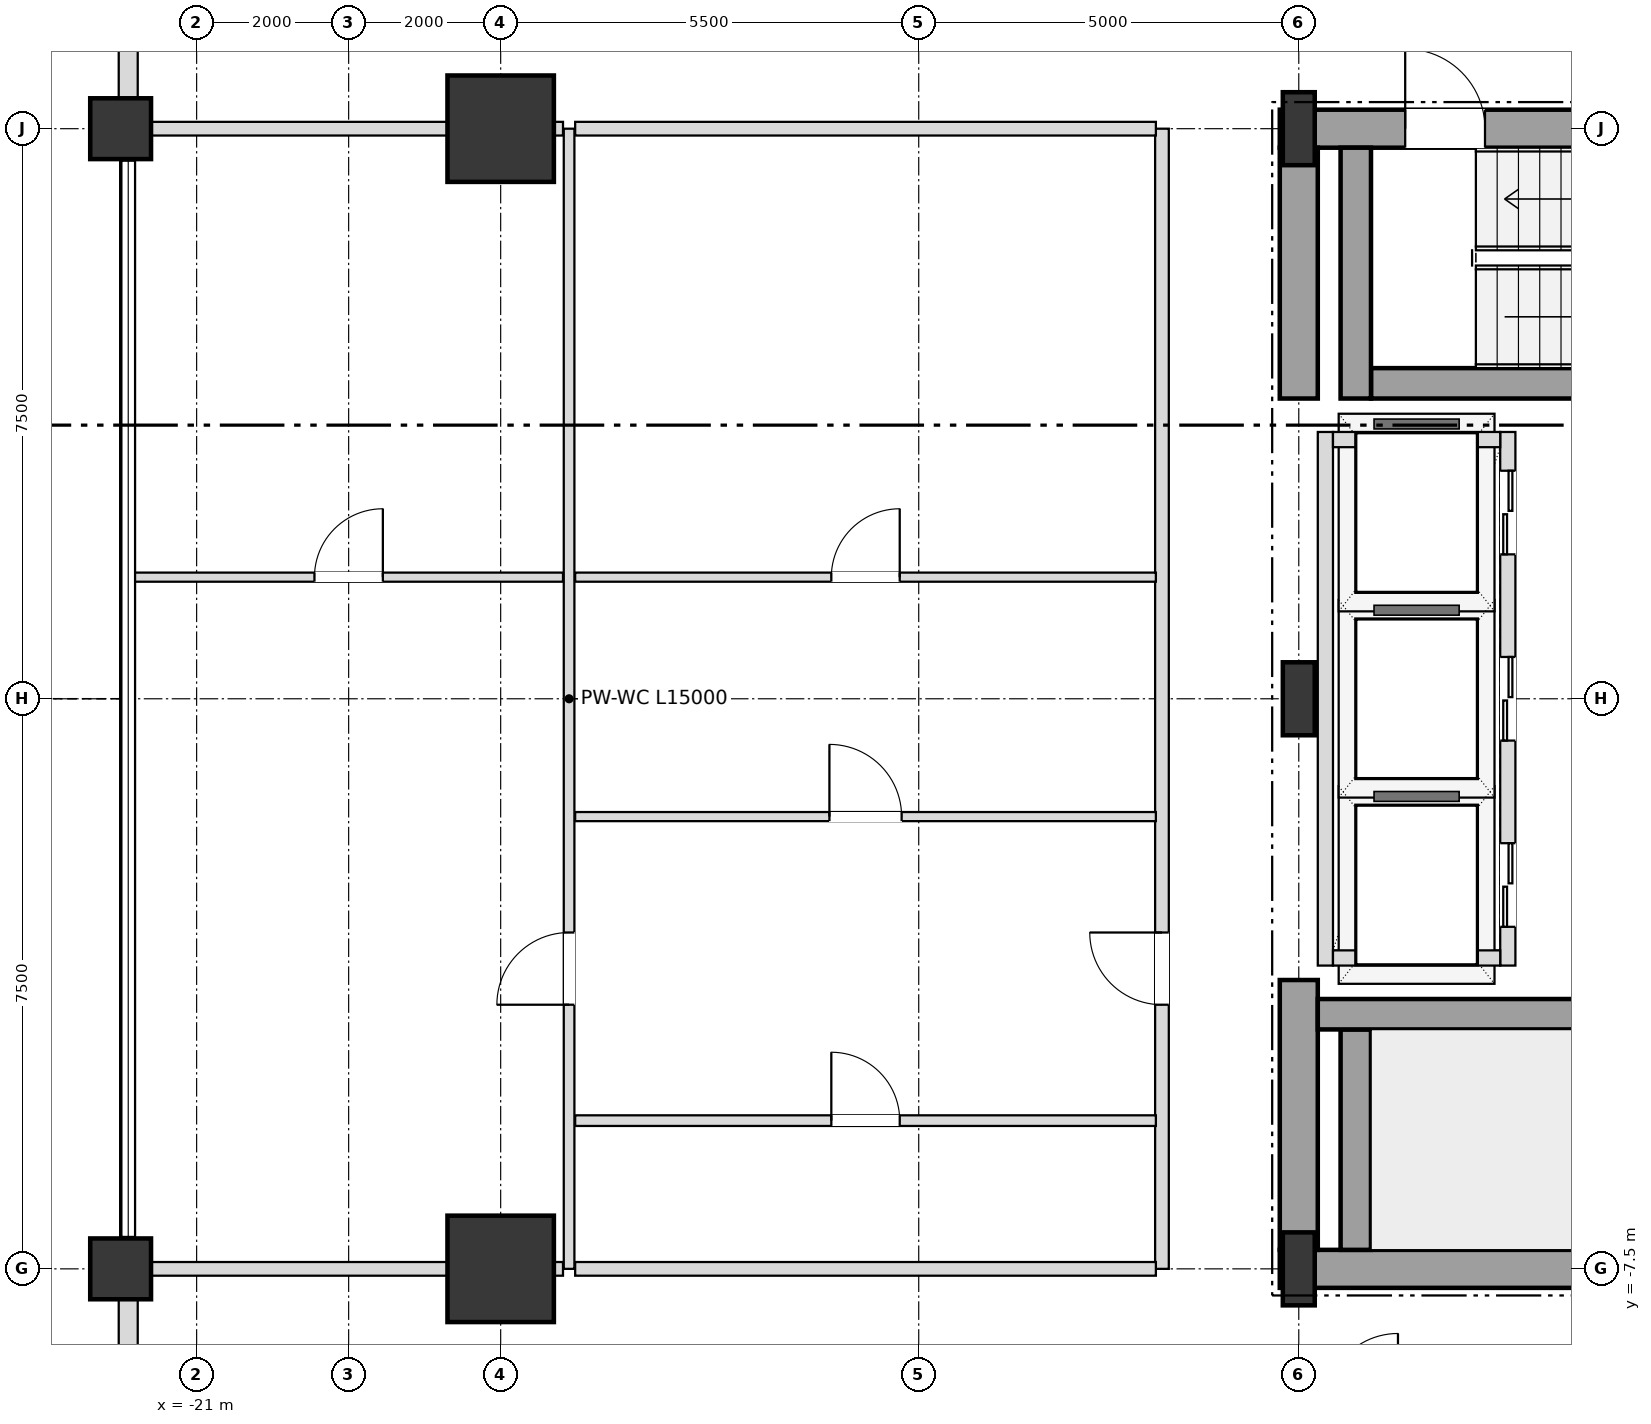
"""IFC4 building model, lengths in metres.
Left out: names, types, materials, properties, quantities, classifications, styles, units other than length and angle.
Written with IfcOpenShell. Run it as: python <this file> out.ifc"""

import sys

from ifc_helpers import new_model, si_unit, direction, frame, frame_2d, origin, origin_2d, place, context, subcontext, project, spatial, rectangle, i_section, extrude, element, fill, save


model = new_model("IFC4")
c1 = context("Model", 3, precision=1e-05, world=origin(), true_north=direction((0.0, 1.0)))
c2 = subcontext(c1, "Body", "Model", "MODEL_VIEW")
j1 = project(units=[si_unit("LENGTHUNIT", "METRE"), si_unit("PLANEANGLEUNIT", "RADIAN")], contexts=[c1])
p1 = place(None, origin())
s1 = spatial("IfcSite", under=j1, at=p1, CompositionType="ELEMENT")
p2 = place(p1, origin())
s2 = spatial("IfcBuilding", under=s1, at=p2, CompositionType="ELEMENT")
p3 = place(p2, frame((0.0, 0.0, 39.6)))
s3 = spatial("IfcBuildingStorey", under=s2, at=p3, CompositionType="ELEMENT", Elevation=39.6)
for number, where, z_axis, x_axis in (
    (1, (-6.5, -7.5, 0.0), (0.0, 0.0, 1.0), (1.0, 0.0, 0.0)),
    (2, (-6.5, 0.0, 0.0), (0.0, 0.0, 1.0), (1.0, 0.0, 0.0)),
    (3, (-6.5, 7.5, 0.0), (0.0, 0.0, 1.0), (1.0, 0.0, 0.0)),
):
    element("IfcColumn", number, at=place(p3, frame(where, z_axis=z_axis, x_axis=x_axis)), inside=s3, PredefinedType="COLUMN", context=c2, shape_type="SweptSolid", body=[
        extrude(i_section(OverallWidth=0.42, OverallDepth=0.96, WebThickness=0.022, FlangeThickness=0.034, at=origin_2d()), origin(), (0.0, 0.0, 1.0), 3.6),
    ])
for number, where, z_axis, x_axis in (
    (4, (-17.0, 7.5, 0.0), (0.0, 0.0, 1.0), (1.0, 0.0, 0.0)),
    (5, (-17.0, -7.5, 0.0), (0.0, 0.0, 1.0), (1.0, 0.0, 0.0)),
):
    element("IfcColumn", number, at=place(p3, frame(where, z_axis=z_axis, x_axis=x_axis)), inside=s3, PredefinedType="USERDEFINED", context=c2, shape_type="SweptSolid", body=[
        extrude(rectangle(XDim=1.4, YDim=1.4, at=origin_2d()), origin(), (0.0, 0.0, 1.0), 3.6),
    ])
for number, where, z_axis, x_axis in (
    (6, (-22.0, -7.5, 0.0), (0.0, 0.0, 1.0), (1.0, 0.0, 0.0)),
    (7, (-22.0, 7.5, 0.0), (0.0, 0.0, 1.0), (1.0, 0.0, 0.0)),
):
    element("IfcColumn", number, at=place(p3, frame(where, z_axis=z_axis, x_axis=x_axis)), inside=s3, PredefinedType="COLUMN", context=c2, shape_type="SweptSolid", body=[
        extrude(rectangle(XDim=0.8, YDim=0.8, at=origin_2d()), origin(), (0.0, 0.0, 1.0), 3.6),
    ])
p4 = place(p3, frame((-21.9, 12.605, 0.0), z_axis=(0.0, 0.0, 1.0), x_axis=(0.0, -1.0, 0.0)))
e8 = element("IfcWall", 8, at=p4, inside=s3, PredefinedType="SOLIDWALL", context=c2, shape_type="SweptSolid", body=[
    extrude(rectangle(XDim=4.71, YDim=0.25, at=frame_2d((2.355, 0.0))), origin(), (0.0, 0.0, 1.0), 2.736),
])
p5 = place(p4, frame((1.455, 0.0, 0.72)))
e9 = element("IfcOpeningElement", 9, at=p5, cuts=e8, PredefinedType="OPENING", context=c2, shape_type="SweptSolid", body=[
    extrude(rectangle(XDim=1.8, YDim=1.68, at=frame_2d((0.9, 0.84))), frame((0.0, 0.135, 0.0), z_axis=(0.0, -1.0, 0.0), x_axis=(1.0, 0.0, 0.0)), (0.0, 0.0, 1.0), 0.27),
])
p6 = place(p3, frame((-21.9, -7.895, 0.0), z_axis=(0.0, 0.0, 1.0), x_axis=(0.0, -1.0, 0.0)))
e10 = element("IfcWall", 10, at=p6, inside=s3, PredefinedType="SOLIDWALL", context=c2, shape_type="SweptSolid", body=[
    extrude(rectangle(XDim=4.71, YDim=0.25, at=frame_2d((2.355, 0.0))), origin(), (0.0, 0.0, 1.0), 2.736),
])
p7 = place(p6, frame((1.455, 0.0, 0.72)))
e11 = element("IfcOpeningElement", 11, at=p7, cuts=e10, PredefinedType="OPENING", context=c2, shape_type="SweptSolid", body=[
    extrude(rectangle(XDim=1.8, YDim=1.68, at=frame_2d((0.9, 0.84))), frame((0.0, 0.135, 0.0), z_axis=(0.0, -1.0, 0.0), x_axis=(1.0, 0.0, 0.0)), (0.0, 0.0, 1.0), 0.27),
])
p8 = place(p3, frame((-6.75, -7.5, 0.0), z_axis=(0.0, 0.0, 1.0), x_axis=(1.0, 0.0, 0.0)))
e12 = element("IfcWall", 12, at=p8, inside=s3, PredefinedType="SHEAR", context=c2, shape_type="SweptSolid", body=[
    extrude(rectangle(XDim=6.75, YDim=0.5, at=frame_2d((3.375, 0.0))), origin(), (0.0, 0.0, 1.0), 3.38),
])
p9 = place(p3, frame((-6.75, 7.5, 0.0), z_axis=(0.0, 0.0, 1.0), x_axis=(1.0, 0.0, 0.0)))
e13 = element("IfcWall", 13, at=p9, inside=s3, PredefinedType="SHEAR", context=c2, shape_type="SweptSolid", body=[
    extrude(rectangle(XDim=6.75, YDim=0.5, at=frame_2d((3.375, 0.0))), origin(), (0.0, 0.0, 1.0), 3.38),
])
p10 = place(p9, frame((1.65, 0.0, 0.0)))
e14 = element("IfcOpeningElement", 14, at=p10, cuts=e13, PredefinedType="OPENING", context=c2, shape_type="SweptSolid", body=[
    extrude(rectangle(XDim=1.05, YDim=2.15, at=frame_2d((0.525, 1.075))), frame((0.0, 0.26, 0.0), z_axis=(0.0, -1.0, 0.0), x_axis=(1.0, 0.0, 0.0)), (0.0, 0.0, 1.0), 0.52),
])
p11 = place(p3, frame((-6.5, -7.25, 0.0), z_axis=(0.0, 0.0, 1.0), x_axis=(0.0, 1.0, 0.0)))
e15 = element("IfcWall", 15, at=p11, inside=s3, PredefinedType="SHEAR", context=c2, shape_type="SweptSolid", body=[
    extrude(rectangle(XDim=3.55, YDim=0.5, at=frame_2d((1.775, 0.0))), origin(), (0.0, 0.0, 1.0), 3.38),
])
p12 = place(p3, frame((-6.5, 3.95, 0.0), z_axis=(0.0, 0.0, 1.0), x_axis=(0.0, 1.0, 0.0)))
e16 = element("IfcWall", 16, at=p12, inside=s3, PredefinedType="SHEAR", context=c2, shape_type="SweptSolid", body=[
    extrude(rectangle(XDim=3.3, YDim=0.5, at=frame_2d((1.65, 0.0))), origin(), (0.0, 0.0, 1.0), 3.38),
])
p13 = place(p3, frame((-5.75, -7.25, 0.0), z_axis=(0.0, 0.0, 1.0), x_axis=(0.0, 1.0, 0.0)))
e17 = element("IfcWall", 17, at=p13, inside=s3, PredefinedType="SHEAR", context=c2, shape_type="SweptSolid", body=[
    extrude(rectangle(XDim=2.9, YDim=0.4, at=frame_2d((1.45, 0.0))), origin(), (0.0, 0.0, 1.0), 3.38),
])
p14 = place(p3, frame((-6.25, -4.15, 0.0), z_axis=(0.0, 0.0, 1.0), x_axis=(1.0, 0.0, 0.0)))
e18 = element("IfcWall", 18, at=p14, inside=s3, PredefinedType="SHEAR", context=c2, shape_type="SweptSolid", body=[
    extrude(rectangle(XDim=7.78, YDim=0.4, at=frame_2d((3.89, 0.0))), origin(), (0.0, 0.0, 1.0), 3.38),
])
p15 = place(p3, frame((-5.55, 4.15, 0.0), z_axis=(0.0, 0.0, 1.0), x_axis=(1.0, 0.0, 0.0)))
e19 = element("IfcWall", 19, at=p15, inside=s3, PredefinedType="SHEAR", context=c2, shape_type="SweptSolid", body=[
    extrude(rectangle(XDim=7.08, YDim=0.4, at=frame_2d((3.54, 0.0))), origin(), (0.0, 0.0, 1.0), 3.38),
])
p16 = place(p3, frame((-5.75, 3.95, 0.0), z_axis=(0.0, 0.0, 1.0), x_axis=(0.0, 1.0, 0.0)))
e20 = element("IfcWall", 20, at=p16, inside=s3, PredefinedType="SHEAR", context=c2, shape_type="SweptSolid", body=[
    extrude(rectangle(XDim=3.3, YDim=0.4, at=frame_2d((1.65, 0.0))), origin(), (0.0, 0.0, 1.0), 3.38),
])
p17 = place(p3, frame((-3.75, -3.51, 0.0), z_axis=(0.0, 0.0, 1.0), x_axis=(0.0, 1.0, 0.0)))
e21 = element("IfcWall", 21, at=p17, inside=s3, PredefinedType="SOLIDWALL", context=c2, shape_type="SweptSolid", body=[
    extrude(rectangle(XDim=7.02, YDim=0.2, at=frame_2d((3.51, 0.0))), origin(), (0.0, 0.0, 1.0), 3.38),
])
p18 = place(p17, frame((0.51, 0.0, 0.0)))
e22 = element("IfcOpeningElement", 22, at=p18, cuts=e21, PredefinedType="OPENING", context=c2, shape_type="SweptSolid", body=[
    extrude(rectangle(XDim=1.1, YDim=2.15, at=frame_2d((0.55, 1.075))), frame((0.0, 0.11, 0.0), z_axis=(0.0, -1.0, 0.0), x_axis=(1.0, 0.0, 0.0)), (0.0, 0.0, 1.0), 0.22),
])
p19 = place(p17, frame((2.96, 0.0, 0.0)))
e23 = element("IfcOpeningElement", 23, at=p19, cuts=e21, PredefinedType="OPENING", context=c2, shape_type="SweptSolid", body=[
    extrude(rectangle(XDim=1.1, YDim=2.15, at=frame_2d((0.55, 1.075))), frame((0.0, 0.11, 0.0), z_axis=(0.0, -1.0, 0.0), x_axis=(1.0, 0.0, 0.0)), (0.0, 0.0, 1.0), 0.22),
])
p20 = place(p17, frame((5.41, 0.0, 0.0)))
e24 = element("IfcOpeningElement", 24, at=p20, cuts=e21, PredefinedType="OPENING", context=c2, shape_type="SweptSolid", body=[
    extrude(rectangle(XDim=1.1, YDim=2.15, at=frame_2d((0.55, 1.075))), frame((0.0, 0.11, 0.0), z_axis=(0.0, -1.0, 0.0), x_axis=(1.0, 0.0, 0.0)), (0.0, 0.0, 1.0), 0.22),
])
p21 = place(p3, frame((-6.15, -3.51, 0.0), z_axis=(0.0, 0.0, 1.0), x_axis=(0.0, 1.0, 0.0)))
e25 = element("IfcWall", 25, at=p21, inside=s3, PredefinedType="SOLIDWALL", context=c2, shape_type="SweptSolid", body=[
    extrude(rectangle(XDim=7.02, YDim=0.2, at=frame_2d((3.51, 0.0))), origin(), (0.0, 0.0, 1.0), 3.38),
])
for number, where, z_axis, x_axis in (
    (26, (-6.05, -3.41, 0.0), (0.0, 0.0, 1.0), (1.0, 0.0, 0.0)),
    (27, (-6.05, 3.41, 0.0), (0.0, 0.0, 1.0), (1.0, 0.0, 0.0)),
):
    element("IfcWall", number, at=place(p3, frame(where, z_axis=z_axis, x_axis=x_axis)), inside=s3, PredefinedType="SOLIDWALL", context=c2, shape_type="SweptSolid", body=[
        extrude(rectangle(XDim=2.2, YDim=0.2, at=frame_2d((1.1, 0.0))), origin(), (0.0, 0.0, 1.0), 3.38),
    ])
p22 = place(p3, frame((-16.1, -7.5, 0.0), z_axis=(0.0, 0.0, 1.0), x_axis=(0.0, 1.0, 0.0)))
e28 = element("IfcWall", 28, at=p22, inside=s3, PredefinedType="PARTITIONING", context=c2, shape_type="SweptSolid", body=[
    extrude(rectangle(XDim=15.0, YDim=0.14, at=frame_2d((7.5, 0.0))), origin(), (0.0, 0.0, 1.0), 3.38),
])
p23 = place(p22, frame((3.475, 0.0, 0.0)))
e29 = element("IfcOpeningElement", 29, at=p23, cuts=e28, PredefinedType="OPENING", context=c2, shape_type="SweptSolid", body=[
    extrude(rectangle(XDim=0.95, YDim=2.1, at=frame_2d((0.475, 1.05))), frame((0.0, 0.08, 0.0), z_axis=(0.0, -1.0, 0.0), x_axis=(1.0, 0.0, 0.0)), (0.0, 0.0, 1.0), 0.16),
])
p24 = place(p3, frame((-8.3, -7.5, 0.0), z_axis=(0.0, 0.0, 1.0), x_axis=(0.0, 1.0, 0.0)))
e30 = element("IfcWall", 30, at=p24, inside=s3, PredefinedType="PARTITIONING", context=c2, shape_type="SweptSolid", body=[
    extrude(rectangle(XDim=15.0, YDim=0.18, at=frame_2d((7.5, 0.0))), origin(), (0.0, 0.0, 1.0), 3.38),
])
p25 = place(p24, frame((3.475, 0.0, 0.0)))
e31 = element("IfcOpeningElement", 31, at=p25, cuts=e30, PredefinedType="OPENING", context=c2, shape_type="SweptSolid", body=[
    extrude(rectangle(XDim=0.95, YDim=2.15, at=frame_2d((0.475, 1.075))), frame((0.0, 0.1, 0.0), z_axis=(0.0, -1.0, 0.0), x_axis=(1.0, 0.0, 0.0)), (0.0, 0.0, 1.0), 0.2),
])
p26 = place(p3, frame((-21.9, -7.5, 0.0), z_axis=(0.0, 0.0, 1.0), x_axis=(1.0, 0.0, 0.0)))
e32 = element("IfcWall", 32, at=p26, inside=s3, PredefinedType="PARTITIONING", context=c2, shape_type="SweptSolid", body=[
    extrude(rectangle(XDim=5.72, YDim=0.18, at=frame_2d((2.86, 0.0))), origin(), (0.0, 0.0, 1.0), 2.816),
])
p27 = place(p3, frame((-16.02, -7.5, 0.0), z_axis=(0.0, 0.0, 1.0), x_axis=(1.0, 0.0, 0.0)))
e33 = element("IfcWall", 33, at=p27, inside=s3, PredefinedType="PARTITIONING", context=c2, shape_type="SweptSolid", body=[
    extrude(rectangle(XDim=7.64, YDim=0.18, at=frame_2d((3.82, 0.0))), origin(), (0.0, 0.0, 1.0), 2.816),
])
p28 = place(p3, frame((-16.02, -5.55, 0.0), z_axis=(0.0, 0.0, 1.0), x_axis=(1.0, 0.0, 0.0)))
e34 = element("IfcWall", 34, at=p28, inside=s3, PredefinedType="PARTITIONING", context=c2, shape_type="SweptSolid", body=[
    extrude(rectangle(XDim=7.64, YDim=0.14, at=frame_2d((3.82, 0.0))), origin(), (0.0, 0.0, 1.0), 2.948),
])
p29 = place(p28, frame((3.37, 0.0, 0.0)))
e35 = element("IfcOpeningElement", 35, at=p29, cuts=e34, PredefinedType="OPENING", context=c2, shape_type="SweptSolid", body=[
    extrude(rectangle(XDim=0.9, YDim=2.1, at=frame_2d((0.45, 1.05))), frame((0.0, 0.08, 0.0), z_axis=(0.0, -1.0, 0.0), x_axis=(1.0, 0.0, 0.0)), (0.0, 0.0, 1.0), 0.16),
])
p30 = place(p3, frame((-16.02, -1.55, 0.0), z_axis=(0.0, 0.0, 1.0), x_axis=(1.0, 0.0, 0.0)))
e36 = element("IfcWall", 36, at=p30, inside=s3, PredefinedType="PARTITIONING", context=c2, shape_type="SweptSolid", body=[
    extrude(rectangle(XDim=7.64, YDim=0.12, at=frame_2d((3.82, 0.0))), origin(), (0.0, 0.0, 1.0), 2.948),
])
p31 = place(p30, frame((3.345, 0.0, 0.0)))
e37 = element("IfcOpeningElement", 37, at=p31, cuts=e36, PredefinedType="OPENING", context=c2, shape_type="SweptSolid", body=[
    extrude(rectangle(XDim=0.95, YDim=2.1, at=frame_2d((0.475, 1.05))), frame((0.0, 0.07, 0.0), z_axis=(0.0, -1.0, 0.0), x_axis=(1.0, 0.0, 0.0)), (0.0, 0.0, 1.0), 0.14),
])
p32 = place(p3, frame((-21.82, 1.6, 0.0), z_axis=(0.0, 0.0, 1.0), x_axis=(1.0, 0.0, 0.0)))
e38 = element("IfcWall", 38, at=p32, inside=s3, PredefinedType="PARTITIONING", context=c2, shape_type="SweptSolid", body=[
    extrude(rectangle(XDim=5.64, YDim=0.12, at=frame_2d((2.82, 0.0))), origin(), (0.0, 0.0, 1.0), 2.816),
])
p33 = place(p32, frame((2.37, 0.0, 0.0)))
e39 = element("IfcOpeningElement", 39, at=p33, cuts=e38, PredefinedType="OPENING", context=c2, shape_type="SweptSolid", body=[
    extrude(rectangle(XDim=0.9, YDim=2.1, at=frame_2d((0.45, 1.05))), frame((0.0, 0.07, 0.0), z_axis=(0.0, -1.0, 0.0), x_axis=(1.0, 0.0, 0.0)), (0.0, 0.0, 1.0), 0.14),
])
p34 = place(p3, frame((-16.02, 1.6, 0.0), z_axis=(0.0, 0.0, 1.0), x_axis=(1.0, 0.0, 0.0)))
e40 = element("IfcWall", 40, at=p34, inside=s3, PredefinedType="PARTITIONING", context=c2, shape_type="SweptSolid", body=[
    extrude(rectangle(XDim=7.64, YDim=0.12, at=frame_2d((3.82, 0.0))), origin(), (0.0, 0.0, 1.0), 2.948),
])
p35 = place(p34, frame((3.37, 0.0, 0.0)))
e41 = element("IfcOpeningElement", 41, at=p35, cuts=e40, PredefinedType="OPENING", context=c2, shape_type="SweptSolid", body=[
    extrude(rectangle(XDim=0.9, YDim=2.1, at=frame_2d((0.45, 1.05))), frame((0.0, 0.07, 0.0), z_axis=(0.0, -1.0, 0.0), x_axis=(1.0, 0.0, 0.0)), (0.0, 0.0, 1.0), 0.14),
])
p36 = place(p3, frame((-21.9, 7.5, 0.0), z_axis=(0.0, 0.0, 1.0), x_axis=(1.0, 0.0, 0.0)))
e42 = element("IfcWall", 42, at=p36, inside=s3, PredefinedType="PARTITIONING", context=c2, shape_type="SweptSolid", body=[
    extrude(rectangle(XDim=5.72, YDim=0.18, at=frame_2d((2.86, 0.0))), origin(), (0.0, 0.0, 1.0), 2.816),
])
p37 = place(p3, frame((-16.02, 7.5, 0.0), z_axis=(0.0, 0.0, 1.0), x_axis=(1.0, 0.0, 0.0)))
e43 = element("IfcWall", 43, at=p37, inside=s3, PredefinedType="PARTITIONING", context=c2, shape_type="SweptSolid", body=[
    extrude(rectangle(XDim=7.64, YDim=0.18, at=frame_2d((3.82, 0.0))), origin(), (0.0, 0.0, 1.0), 2.816),
])
p38 = place(p10, origin())
e44 = element("IfcDoor", 44, at=p38, inside=s3, OperationType="SINGLE_SWING_LEFT", PredefinedType="DOOR", context=c2, shape_type="SweptSolid", body=[
    extrude(rectangle(XDim=1.05, YDim=2.15, at=frame_2d((0.525, 1.075))), frame((0.0, 0.025, 0.0), z_axis=(0.0, -1.0, 0.0), x_axis=(1.0, 0.0, 0.0)), (0.0, 0.0, 1.0), 0.05),
])
fill(e14, e44)
p39 = place(p18, origin())
e45 = element("IfcDoor", 45, at=p39, inside=s3, OperationType="DOUBLE_DOOR_SLIDING", PredefinedType="DOOR", context=c2, shape_type="SweptSolid", body=[
    extrude(rectangle(XDim=1.1, YDim=2.15, at=frame_2d((0.55, 1.075))), frame((0.0, 0.025, 0.0), z_axis=(0.0, -1.0, 0.0), x_axis=(1.0, 0.0, 0.0)), (0.0, 0.0, 1.0), 0.05),
])
fill(e22, e45)
p40 = place(p19, origin())
e46 = element("IfcDoor", 46, at=p40, inside=s3, OperationType="DOUBLE_DOOR_SLIDING", PredefinedType="DOOR", context=c2, shape_type="SweptSolid", body=[
    extrude(rectangle(XDim=1.1, YDim=2.15, at=frame_2d((0.55, 1.075))), frame((0.0, 0.025, 0.0), z_axis=(0.0, -1.0, 0.0), x_axis=(1.0, 0.0, 0.0)), (0.0, 0.0, 1.0), 0.05),
])
fill(e23, e46)
p41 = place(p20, origin())
e47 = element("IfcDoor", 47, at=p41, inside=s3, OperationType="DOUBLE_DOOR_SLIDING", PredefinedType="DOOR", context=c2, shape_type="SweptSolid", body=[
    extrude(rectangle(XDim=1.1, YDim=2.15, at=frame_2d((0.55, 1.075))), frame((0.0, 0.025, 0.0), z_axis=(0.0, -1.0, 0.0), x_axis=(1.0, 0.0, 0.0)), (0.0, 0.0, 1.0), 0.05),
])
fill(e24, e47)
p42 = place(p29, origin())
e48 = element("IfcDoor", 48, at=p42, inside=s3, OperationType="SINGLE_SWING_LEFT", PredefinedType="DOOR", context=c2, shape_type="SweptSolid", body=[
    extrude(rectangle(XDim=0.9, YDim=2.1, at=frame_2d((0.45, 1.05))), frame((0.0, 0.025, 0.0), z_axis=(0.0, -1.0, 0.0), x_axis=(1.0, 0.0, 0.0)), (0.0, 0.0, 1.0), 0.05),
])
fill(e35, e48)
p43 = place(p25, origin())
e49 = element("IfcDoor", 49, at=p43, inside=s3, OperationType="SINGLE_SWING_RIGHT", PredefinedType="DOOR", context=c2, shape_type="SweptSolid", body=[
    extrude(rectangle(XDim=0.95, YDim=2.15, at=frame_2d((0.475, 1.075))), frame((0.0, 0.025, 0.0), z_axis=(0.0, -1.0, 0.0), x_axis=(1.0, 0.0, 0.0)), (0.0, 0.0, 1.0), 0.05),
])
fill(e31, e49)
p44 = place(p31, origin())
e50 = element("IfcDoor", 50, at=p44, inside=s3, OperationType="SINGLE_SWING_LEFT", PredefinedType="DOOR", context=c2, shape_type="SweptSolid", body=[
    extrude(rectangle(XDim=0.95, YDim=2.1, at=frame_2d((0.475, 1.05))), frame((0.0, 0.025, 0.0), z_axis=(0.0, -1.0, 0.0), x_axis=(1.0, 0.0, 0.0)), (0.0, 0.0, 1.0), 0.05),
])
fill(e37, e50)
p45 = place(p35, origin())
e51 = element("IfcDoor", 51, at=p45, inside=s3, OperationType="SINGLE_SWING_RIGHT", PredefinedType="DOOR", context=c2, shape_type="SweptSolid", body=[
    extrude(rectangle(XDim=0.9, YDim=2.1, at=frame_2d((0.45, 1.05))), frame((0.0, 0.025, 0.0), z_axis=(0.0, -1.0, 0.0), x_axis=(1.0, 0.0, 0.0)), (0.0, 0.0, 1.0), 0.05),
])
fill(e41, e51)
p46 = place(p23, origin())
e52 = element("IfcDoor", 52, at=p46, inside=s3, OperationType="SINGLE_SWING_LEFT", PredefinedType="DOOR", context=c2, shape_type="SweptSolid", body=[
    extrude(rectangle(XDim=0.95, YDim=2.1, at=frame_2d((0.475, 1.05))), frame((0.0, 0.025, 0.0), z_axis=(0.0, -1.0, 0.0), x_axis=(1.0, 0.0, 0.0)), (0.0, 0.0, 1.0), 0.05),
])
fill(e29, e52)
p47 = place(p33, origin())
e53 = element("IfcDoor", 53, at=p47, inside=s3, OperationType="SINGLE_SWING_RIGHT", PredefinedType="DOOR", context=c2, shape_type="SweptSolid", body=[
    extrude(rectangle(XDim=0.9, YDim=2.1, at=frame_2d((0.45, 1.05))), frame((0.0, 0.025, 0.0), z_axis=(0.0, -1.0, 0.0), x_axis=(1.0, 0.0, 0.0)), (0.0, 0.0, 1.0), 0.05),
])
fill(e39, e53)
save(model, sys.argv[1])
